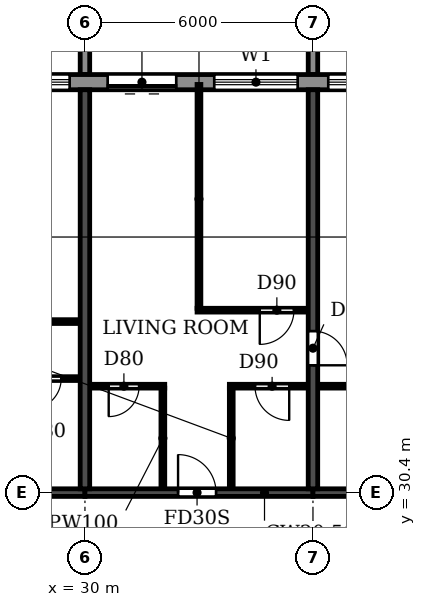
"""IFC4 building model, lengths in metres.
Left out: names, types, materials, properties, quantities, classifications, styles, units other than length and angle.
Written with IfcOpenShell. Run it as: python <this file> out.ifc"""

import sys

from ifc_helpers import new_model, si_unit, direction, frame, frame_2d, origin, place, context, subcontext, project, spatial, polyline, rectangle, outline, extrude, source, transform, mapped, element, fill, save


model = new_model("IFC4")
c1 = context("Model", 3, precision=1e-05, world=origin(), true_north=direction((0.0, 1.0)))
c2 = subcontext(c1, "Body", "Model", "MODEL_VIEW")
j1 = project(units=[si_unit("LENGTHUNIT", "METRE"), si_unit("PLANEANGLEUNIT", "RADIAN")], contexts=[c1])
p1 = place(None, origin())
s1 = spatial("IfcSite", under=j1, at=p1, CompositionType="ELEMENT")
p2 = place(p1, origin())
s2 = spatial("IfcBuilding", under=s1, at=p2, CompositionType="ELEMENT")
p3 = place(p2, frame((0.0, 0.0, 191.7)))
s3 = spatial("IfcBuildingStorey", under=s2, at=p3, CompositionType="ELEMENT", Elevation=191.7)
p4 = place(p3, frame((30.0, 30.5, 0.0), z_axis=(0.0, 0.0, 1.0), x_axis=(0.0, 1.0, 0.0)))
e1 = element("IfcWall", 1, at=p4, inside=s3, PredefinedType="SHEAR", context=c2, shape_type="SweptSolid", body=[
    extrude(rectangle(XDim=10.5, YDim=0.25, at=frame_2d((5.25, 0.0))), origin(), (0.0, 0.0, 1.0), 3.08),
])
p5 = place(p3, frame((36.0, 30.5, 0.0), z_axis=(0.0, 0.0, 1.0), x_axis=(0.0, 1.0, 0.0)))
e2 = element("IfcWall", 2, at=p5, inside=s3, PredefinedType="SHEAR", context=c2, shape_type="SweptSolid", body=[
    extrude(rectangle(XDim=10.5, YDim=0.25, at=frame_2d((5.25, 0.0))), origin(), (0.0, 0.0, 1.0), 3.08),
])
p6 = place(p5, frame((3.25, 0.0, 0.0)))
e3 = element("IfcOpeningElement", 3, at=p6, cuts=e2, PredefinedType="OPENING", context=c2, shape_type="SweptSolid", body=[
    extrude(rectangle(XDim=0.9, YDim=2.1, at=frame_2d((0.45, 1.05))), frame((0.0, 0.135, 0.0), z_axis=(0.0, -1.0, 0.0), x_axis=(1.0, 0.0, 0.0)), (0.0, 0.0, 1.0), 0.27),
])
p7 = place(p3, frame((24.0, 30.4, 0.0), z_axis=(0.0, 0.0, 1.0), x_axis=(1.0, 0.0, 0.0)))
e4 = element("IfcWall", 4, at=p7, inside=s3, PredefinedType="SHEAR", context=c2, shape_type="SweptSolid", body=[
    extrude(rectangle(XDim=6.0, YDim=0.2, at=frame_2d((3.0, 0.0))), origin(), (0.0, 0.0, 1.0), 2.48),
])
p8 = place(p7, frame((2.55, 0.0, 0.0)))
e5 = element("IfcOpeningElement", 5, at=p8, cuts=e4, PredefinedType="OPENING", context=c2, shape_type="SweptSolid", body=[
    extrude(rectangle(XDim=1.0, YDim=2.1, at=frame_2d((0.5, 1.05))), frame((0.0, 0.11, 0.0), z_axis=(0.0, -1.0, 0.0), x_axis=(1.0, 0.0, 0.0)), (0.0, 0.0, 1.0), 0.22),
])
p9 = place(p3, frame((30.0, 30.4, 0.0), z_axis=(0.0, 0.0, 1.0), x_axis=(1.0, 0.0, 0.0)))
e6 = element("IfcWall", 6, at=p9, inside=s3, PredefinedType="SHEAR", context=c2, shape_type="SweptSolid", body=[
    extrude(rectangle(XDim=6.0, YDim=0.2, at=frame_2d((3.0, 0.0))), origin(), (0.0, 0.0, 1.0), 2.48),
])
p10 = place(p9, frame((2.45, 0.0, 0.0)))
e7 = element("IfcOpeningElement", 7, at=p10, cuts=e6, PredefinedType="OPENING", context=c2, shape_type="SweptSolid", body=[
    extrude(rectangle(XDim=1.0, YDim=2.1, at=frame_2d((0.5, 1.05))), frame((0.0, 0.11, 0.0), z_axis=(0.0, -1.0, 0.0), x_axis=(1.0, 0.0, 0.0)), (0.0, 0.0, 1.0), 0.22),
])
p11 = place(p3, frame((36.0, 30.4, 0.0), z_axis=(0.0, 0.0, 1.0), x_axis=(1.0, 0.0, 0.0)))
e8 = element("IfcWall", 8, at=p11, inside=s3, PredefinedType="SHEAR", context=c2, shape_type="SweptSolid", body=[
    extrude(rectangle(XDim=6.0, YDim=0.2, at=frame_2d((3.0, 0.0))), origin(), (0.0, 0.0, 1.0), 2.48),
])
p12 = place(p3, frame((79.317, 41.2, 0.0), z_axis=(0.0, 0.0, 1.0), x_axis=(-1.0, 0.0, 0.0)))
e9 = element("IfcWall", 9, at=p12, inside=s3, PredefinedType="STANDARD", context=c2, shape_type="SweptSolid", body=[
    extrude(rectangle(XDim=56.634, YDim=0.4, at=frame_2d((28.317, 0.0))), origin(), (0.0, 0.0, 1.0), 3.08),
])
p13 = place(p12, frame((52.917, 0.0, 0.0)))
e10 = element("IfcOpeningElement", 10, at=p13, cuts=e9, PredefinedType="OPENING", context=c2, shape_type="SweptSolid", body=[
    extrude(rectangle(XDim=1.8, YDim=2.4, at=frame_2d((0.9, 1.2))), frame((0.0, 0.21, 0.0), z_axis=(0.0, -1.0, 0.0), x_axis=(1.0, 0.0, 0.0)), (0.0, 0.0, 1.0), 0.42),
])
p14 = place(p12, frame((49.717, 0.0, 0.9)))
e11 = element("IfcOpeningElement", 11, at=p14, cuts=e9, PredefinedType="OPENING", context=c2, shape_type="SweptSolid", body=[
    extrude(rectangle(XDim=2.2, YDim=1.5, at=frame_2d((1.1, 0.75))), frame((0.0, 0.21, 0.0), z_axis=(0.0, -1.0, 0.0), x_axis=(1.0, 0.0, 0.0)), (0.0, 0.0, 1.0), 0.42),
])
p15 = place(p12, frame((46.917, 0.0, 0.0)))
e12 = element("IfcOpeningElement", 12, at=p15, cuts=e9, PredefinedType="OPENING", context=c2, shape_type="SweptSolid", body=[
    extrude(rectangle(XDim=1.8, YDim=2.4, at=frame_2d((0.9, 1.2))), frame((0.0, 0.21, 0.0), z_axis=(0.0, -1.0, 0.0), x_axis=(1.0, 0.0, 0.0)), (0.0, 0.0, 1.0), 0.42),
])
p16 = place(p12, frame((43.717, 0.0, 0.9)))
e13 = element("IfcOpeningElement", 13, at=p16, cuts=e9, PredefinedType="OPENING", context=c2, shape_type="SweptSolid", body=[
    extrude(rectangle(XDim=2.2, YDim=1.5, at=frame_2d((1.1, 0.75))), frame((0.0, 0.21, 0.0), z_axis=(0.0, -1.0, 0.0), x_axis=(1.0, 0.0, 0.0)), (0.0, 0.0, 1.0), 0.42),
])
p17 = place(p12, frame((40.717, 0.0, 0.9)))
e14 = element("IfcOpeningElement", 14, at=p17, cuts=e9, PredefinedType="OPENING", context=c2, shape_type="SweptSolid", body=[
    extrude(rectangle(XDim=2.2, YDim=1.5, at=frame_2d((1.1, 0.75))), frame((0.0, 0.21, 0.0), z_axis=(0.0, -1.0, 0.0), x_axis=(1.0, 0.0, 0.0)), (0.0, 0.0, 1.0), 0.42),
])
p18 = place(p12, frame((37.717, 0.0, 0.9)))
e15 = element("IfcOpeningElement", 15, at=p18, cuts=e9, PredefinedType="OPENING", context=c2, shape_type="SweptSolid", body=[
    extrude(rectangle(XDim=2.2, YDim=1.5, at=frame_2d((1.1, 0.75))), frame((0.0, 0.21, 0.0), z_axis=(0.0, -1.0, 0.0), x_axis=(1.0, 0.0, 0.0)), (0.0, 0.0, 1.0), 0.42),
])
p19 = place(p12, frame((34.917, 0.0, 0.0)))
e16 = element("IfcOpeningElement", 16, at=p19, cuts=e9, PredefinedType="OPENING", context=c2, shape_type="SweptSolid", body=[
    extrude(rectangle(XDim=1.8, YDim=2.4, at=frame_2d((0.9, 1.2))), frame((0.0, 0.21, 0.0), z_axis=(0.0, -1.0, 0.0), x_axis=(1.0, 0.0, 0.0)), (0.0, 0.0, 1.0), 0.42),
])
p20 = place(p12, frame((31.717, 0.0, 0.9)))
e17 = element("IfcOpeningElement", 17, at=p20, cuts=e9, PredefinedType="OPENING", context=c2, shape_type="SweptSolid", body=[
    extrude(rectangle(XDim=2.2, YDim=1.5, at=frame_2d((1.1, 0.75))), frame((0.0, 0.21, 0.0), z_axis=(0.0, -1.0, 0.0), x_axis=(1.0, 0.0, 0.0)), (0.0, 0.0, 1.0), 0.42),
])
p21 = place(p12, frame((28.717, 0.0, 0.9)))
e18 = element("IfcOpeningElement", 18, at=p21, cuts=e9, PredefinedType="OPENING", context=c2, shape_type="SweptSolid", body=[
    extrude(rectangle(XDim=2.2, YDim=1.5, at=frame_2d((1.1, 0.75))), frame((0.0, 0.21, 0.0), z_axis=(0.0, -1.0, 0.0), x_axis=(1.0, 0.0, 0.0)), (0.0, 0.0, 1.0), 0.42),
])
p22 = place(p12, frame((25.717, 0.0, 0.9)))
e19 = element("IfcOpeningElement", 19, at=p22, cuts=e9, PredefinedType="OPENING", context=c2, shape_type="SweptSolid", body=[
    extrude(rectangle(XDim=2.2, YDim=1.5, at=frame_2d((1.1, 0.75))), frame((0.0, 0.21, 0.0), z_axis=(0.0, -1.0, 0.0), x_axis=(1.0, 0.0, 0.0)), (0.0, 0.0, 1.0), 0.42),
])
p23 = place(p12, frame((22.917, 0.0, 0.0)))
e20 = element("IfcOpeningElement", 20, at=p23, cuts=e9, PredefinedType="OPENING", context=c2, shape_type="SweptSolid", body=[
    extrude(rectangle(XDim=1.8, YDim=2.4, at=frame_2d((0.9, 1.2))), frame((0.0, 0.21, 0.0), z_axis=(0.0, -1.0, 0.0), x_axis=(1.0, 0.0, 0.0)), (0.0, 0.0, 1.0), 0.42),
])
p24 = place(p12, frame((19.717, 0.0, 0.9)))
e21 = element("IfcOpeningElement", 21, at=p24, cuts=e9, PredefinedType="OPENING", context=c2, shape_type="SweptSolid", body=[
    extrude(rectangle(XDim=2.2, YDim=1.5, at=frame_2d((1.1, 0.75))), frame((0.0, 0.21, 0.0), z_axis=(0.0, -1.0, 0.0), x_axis=(1.0, 0.0, 0.0)), (0.0, 0.0, 1.0), 0.42),
])
p25 = place(p12, frame((16.717, 0.0, 0.9)))
e22 = element("IfcOpeningElement", 22, at=p25, cuts=e9, PredefinedType="OPENING", context=c2, shape_type="SweptSolid", body=[
    extrude(rectangle(XDim=2.2, YDim=1.5, at=frame_2d((1.1, 0.75))), frame((0.0, 0.21, 0.0), z_axis=(0.0, -1.0, 0.0), x_axis=(1.0, 0.0, 0.0)), (0.0, 0.0, 1.0), 0.42),
])
p26 = place(p12, frame((13.717, 0.0, 0.9)))
e23 = element("IfcOpeningElement", 23, at=p26, cuts=e9, PredefinedType="OPENING", context=c2, shape_type="SweptSolid", body=[
    extrude(rectangle(XDim=2.2, YDim=1.5, at=frame_2d((1.1, 0.75))), frame((0.0, 0.21, 0.0), z_axis=(0.0, -1.0, 0.0), x_axis=(1.0, 0.0, 0.0)), (0.0, 0.0, 1.0), 0.42),
])
p27 = place(p12, frame((10.717, 0.0, 0.9)))
e24 = element("IfcOpeningElement", 24, at=p27, cuts=e9, PredefinedType="OPENING", context=c2, shape_type="SweptSolid", body=[
    extrude(rectangle(XDim=2.2, YDim=1.5, at=frame_2d((1.1, 0.75))), frame((0.0, 0.21, 0.0), z_axis=(0.0, -1.0, 0.0), x_axis=(1.0, 0.0, 0.0)), (0.0, 0.0, 1.0), 0.42),
])
p28 = place(p12, frame((7.917, 0.0, 0.0)))
e25 = element("IfcOpeningElement", 25, at=p28, cuts=e9, PredefinedType="OPENING", context=c2, shape_type="SweptSolid", body=[
    extrude(rectangle(XDim=1.8, YDim=2.4, at=frame_2d((0.9, 1.2))), frame((0.0, 0.21, 0.0), z_axis=(0.0, -1.0, 0.0), x_axis=(1.0, 0.0, 0.0)), (0.0, 0.0, 1.0), 0.42),
])
p29 = place(p12, frame((4.717, 0.0, 0.9)))
e26 = element("IfcOpeningElement", 26, at=p29, cuts=e9, PredefinedType="OPENING", context=c2, shape_type="SweptSolid", body=[
    extrude(rectangle(XDim=2.2, YDim=1.5, at=frame_2d((1.1, 0.75))), frame((0.0, 0.21, 0.0), z_axis=(0.0, -1.0, 0.0), x_axis=(1.0, 0.0, 0.0)), (0.0, 0.0, 1.0), 0.42),
])
p30 = place(p12, frame((1.917, 0.0, 0.0)))
e27 = element("IfcOpeningElement", 27, at=p30, cuts=e9, PredefinedType="OPENING", context=c2, shape_type="SweptSolid", body=[
    extrude(rectangle(XDim=1.8, YDim=2.4, at=frame_2d((0.9, 1.2))), frame((0.0, 0.21, 0.0), z_axis=(0.0, -1.0, 0.0), x_axis=(1.0, 0.0, 0.0)), (0.0, 0.0, 1.0), 0.42),
])
m1 = source(origin(), c2, "Body", "SweptSolid", [
    extrude(outline(polyline([(0.0, 0.0), (0.25, 0.0), (0.25, 3.1), (0.0, 3.1), (0.0, 0.0)])), origin(), (0.0, 0.0, 1.0), 3.1),
])
for number, where in (
    (28, (29.875, 41.4, 0.0)),
    (29, (35.875, 41.4, 0.0)),
):
    element("IfcWall", number, at=place(p3, frame(where)), inside=s3, PredefinedType="STANDARD", context=c2, shape_type="MappedRepresentation", body=[
        mapped(m1, transform((0.0, 0.0, 0.0))),
    ])
p31 = place(p3, frame((30.135, 33.2, 0.0), z_axis=(0.0, 0.0, 1.0), x_axis=(1.0, 0.0, 0.0)))
e30 = element("IfcWall", 30, at=p31, inside=s3, PredefinedType="PARTITIONING", context=c2, shape_type="SweptSolid", body=[
    extrude(rectangle(XDim=1.965, YDim=0.1, at=frame_2d((0.982, 0.0))), origin(), (0.0, 0.0, 1.0), 3.08),
])
p32 = place(p31, frame((0.49, 0.0, 0.0)))
e31 = element("IfcOpeningElement", 31, at=p32, cuts=e30, PredefinedType="OPENING", context=c2, shape_type="SweptSolid", body=[
    extrude(rectangle(XDim=0.8, YDim=2.1, at=frame_2d((0.4, 1.05))), frame((0.0, 0.06, 0.0), z_axis=(0.0, -1.0, 0.0), x_axis=(1.0, 0.0, 0.0)), (0.0, 0.0, 1.0), 0.12),
])
p33 = place(p3, frame((33.8, 33.2, 0.0), z_axis=(0.0, 0.0, 1.0), x_axis=(1.0, 0.0, 0.0)))
e32 = element("IfcWall", 32, at=p33, inside=s3, PredefinedType="PARTITIONING", context=c2, shape_type="SweptSolid", body=[
    extrude(rectangle(XDim=2.065, YDim=0.1, at=frame_2d((1.032, 0.0))), origin(), (0.0, 0.0, 1.0), 3.08),
])
p34 = place(p33, frame((0.675, 0.0, 0.0)))
e33 = element("IfcOpeningElement", 33, at=p34, cuts=e32, PredefinedType="OPENING", context=c2, shape_type="SweptSolid", body=[
    extrude(rectangle(XDim=0.9, YDim=2.1, at=frame_2d((0.45, 1.05))), frame((0.0, 0.06, 0.0), z_axis=(0.0, -1.0, 0.0), x_axis=(1.0, 0.0, 0.0)), (0.0, 0.0, 1.0), 0.12),
])
p35 = place(p3, frame((36.135, 33.2, 0.0), z_axis=(0.0, 0.0, 1.0), x_axis=(1.0, 0.0, 0.0)))
e34 = element("IfcWall", 34, at=p35, inside=s3, PredefinedType="PARTITIONING", context=c2, shape_type="SweptSolid", body=[
    extrude(rectangle(XDim=2.965, YDim=0.1, at=frame_2d((1.482, 0.0))), origin(), (0.0, 0.0, 1.0), 3.08),
])
p36 = place(p35, frame((0.965, 0.0, 0.0)))
e35 = element("IfcOpeningElement", 35, at=p36, cuts=e34, PredefinedType="OPENING", context=c2, shape_type="SweptSolid", body=[
    extrude(rectangle(XDim=0.8, YDim=2.1, at=frame_2d((0.4, 1.05))), frame((0.0, 0.06, 0.0), z_axis=(0.0, -1.0, 0.0), x_axis=(1.0, 0.0, 0.0)), (0.0, 0.0, 1.0), 0.12),
])
p37 = place(p3, frame((27.9, 33.4, 0.0), z_axis=(0.0, 0.0, 1.0), x_axis=(1.0, 0.0, 0.0)))
e36 = element("IfcWall", 36, at=p37, inside=s3, PredefinedType="PARTITIONING", context=c2, shape_type="SweptSolid", body=[
    extrude(rectangle(XDim=1.965, YDim=0.1, at=frame_2d((0.982, 0.0))), origin(), (0.0, 0.0, 1.0), 3.08),
])
p38 = place(p37, frame((0.675, 0.0, 0.0)))
e37 = element("IfcOpeningElement", 37, at=p38, cuts=e36, PredefinedType="OPENING", context=c2, shape_type="SweptSolid", body=[
    extrude(rectangle(XDim=0.8, YDim=2.1, at=frame_2d((0.4, 1.05))), frame((0.0, 0.06, 0.0), z_axis=(0.0, -1.0, 0.0), x_axis=(1.0, 0.0, 0.0)), (0.0, 0.0, 1.0), 0.12),
])
p39 = place(p3, frame((26.95, 34.9, 0.0), z_axis=(0.0, 0.0, 1.0), x_axis=(1.0, 0.0, 0.0)))
e38 = element("IfcWall", 38, at=p39, inside=s3, PredefinedType="PARTITIONING", context=c2, shape_type="SweptSolid", body=[
    extrude(rectangle(XDim=2.915, YDim=0.1, at=frame_2d((1.458, 0.0))), origin(), (0.0, 0.0, 1.0), 3.08),
])
p40 = place(p39, frame((0.55, 0.0, 0.0)))
e39 = element("IfcOpeningElement", 39, at=p40, cuts=e38, PredefinedType="OPENING", context=c2, shape_type="SweptSolid", body=[
    extrude(rectangle(XDim=0.9, YDim=2.1, at=frame_2d((0.45, 1.05))), frame((0.0, 0.06, 0.0), z_axis=(0.0, -1.0, 0.0), x_axis=(1.0, 0.0, 0.0)), (0.0, 0.0, 1.0), 0.12),
])
p41 = place(p3, frame((32.95, 35.2, 0.0), z_axis=(0.0, 0.0, 1.0), x_axis=(1.0, 0.0, 0.0)))
e40 = element("IfcWall", 40, at=p41, inside=s3, PredefinedType="PARTITIONING", context=c2, shape_type="SweptSolid", body=[
    extrude(rectangle(XDim=2.915, YDim=0.1, at=frame_2d((1.458, 0.0))), origin(), (0.0, 0.0, 1.0), 3.08),
])
p42 = place(p41, frame((1.65, 0.0, 0.0)))
e41 = element("IfcOpeningElement", 41, at=p42, cuts=e40, PredefinedType="OPENING", context=c2, shape_type="SweptSolid", body=[
    extrude(rectangle(XDim=0.9, YDim=2.1, at=frame_2d((0.45, 1.05))), frame((0.0, 0.06, 0.0), z_axis=(0.0, -1.0, 0.0), x_axis=(1.0, 0.0, 0.0)), (0.0, 0.0, 1.0), 0.12),
])
p43 = place(p3, frame((32.05, 30.51, 0.0), z_axis=(0.0, 0.0, 1.0), x_axis=(0.0, 1.0, 0.0)))
e42 = element("IfcWall", 42, at=p43, inside=s3, PredefinedType="PARTITIONING", context=c2, shape_type="SweptSolid", body=[
    extrude(rectangle(XDim=2.64, YDim=0.1, at=frame_2d((1.32, 0.0))), origin(), (0.0, 0.0, 1.0), 3.08),
])
p44 = place(p3, frame((33.0, 35.25, 0.0), z_axis=(0.0, 0.0, 1.0), x_axis=(0.0, 1.0, 0.0)))
e43 = element("IfcWall", 43, at=p44, inside=s3, PredefinedType="PARTITIONING", context=c2, shape_type="SweptSolid", body=[
    extrude(rectangle(XDim=5.89, YDim=0.1, at=frame_2d((2.945, 0.0))), origin(), (0.0, 0.0, 1.0), 3.08),
])
p45 = place(p3, frame((33.85, 30.51, 0.0), z_axis=(0.0, 0.0, 1.0), x_axis=(0.0, 1.0, 0.0)))
e44 = element("IfcWall", 44, at=p45, inside=s3, PredefinedType="PARTITIONING", context=c2, shape_type="SweptSolid", body=[
    extrude(rectangle(XDim=2.64, YDim=0.1, at=frame_2d((1.32, 0.0))), origin(), (0.0, 0.0, 1.0), 3.08),
])
p46 = place(p14, origin())
e45 = element("IfcWindow", 45, at=p46, inside=s3, PartitioningType="DOUBLE_PANEL_HORIZONTAL", PredefinedType="WINDOW", context=c2, shape_type="SweptSolid", body=[
    extrude(rectangle(XDim=2.2, YDim=1.5, at=frame_2d((1.1, 0.75))), frame((0.0, 0.03, 0.0), z_axis=(0.0, -1.0, 0.0), x_axis=(1.0, 0.0, 0.0)), (0.0, 0.0, 1.0), 0.06),
])
fill(e11, e45)
p47 = place(p15, origin())
e46 = element("IfcDoor", 46, at=p47, inside=s3, OperationType="DOUBLE_DOOR_SLIDING", PredefinedType="DOOR", context=c2, shape_type="SweptSolid", body=[
    extrude(rectangle(XDim=1.8, YDim=2.4, at=frame_2d((0.9, 1.2))), frame((0.0, 0.025, 0.0), z_axis=(0.0, -1.0, 0.0), x_axis=(1.0, 0.0, 0.0)), (0.0, 0.0, 1.0), 0.05),
])
fill(e12, e46)
p48 = place(p16, origin())
e47 = element("IfcWindow", 47, at=p48, inside=s3, PartitioningType="DOUBLE_PANEL_HORIZONTAL", PredefinedType="WINDOW", context=c2, shape_type="SweptSolid", body=[
    extrude(rectangle(XDim=2.2, YDim=1.5, at=frame_2d((1.1, 0.75))), frame((0.0, 0.03, 0.0), z_axis=(0.0, -1.0, 0.0), x_axis=(1.0, 0.0, 0.0)), (0.0, 0.0, 1.0), 0.06),
])
fill(e13, e47)
p49 = place(p17, origin())
e48 = element("IfcWindow", 48, at=p49, inside=s3, PartitioningType="DOUBLE_PANEL_HORIZONTAL", PredefinedType="WINDOW", context=c2, shape_type="SweptSolid", body=[
    extrude(rectangle(XDim=2.2, YDim=1.5, at=frame_2d((1.1, 0.75))), frame((0.0, 0.03, 0.0), z_axis=(0.0, -1.0, 0.0), x_axis=(1.0, 0.0, 0.0)), (0.0, 0.0, 1.0), 0.06),
])
fill(e14, e48)
p50 = place(p38, frame((0.8, 0.0, 0.0), z_axis=(0.0, 0.0, 1.0), x_axis=(-1.0, 0.0, 0.0)))
e49 = element("IfcDoor", 49, at=p50, inside=s3, OperationType="SINGLE_SWING_RIGHT", PredefinedType="DOOR", context=c2, shape_type="SweptSolid", body=[
    extrude(rectangle(XDim=0.8, YDim=2.1, at=frame_2d((0.4, 1.05))), frame((0.0, 0.025, 0.0), z_axis=(0.0, -1.0, 0.0), x_axis=(1.0, 0.0, 0.0)), (0.0, 0.0, 1.0), 0.05),
])
fill(e37, e49)
p51 = place(p32, frame((0.8, 0.0, 0.0), z_axis=(0.0, 0.0, 1.0), x_axis=(-1.0, 0.0, 0.0)))
e50 = element("IfcDoor", 50, at=p51, inside=s3, OperationType="SINGLE_SWING_RIGHT", PredefinedType="DOOR", context=c2, shape_type="SweptSolid", body=[
    extrude(rectangle(XDim=0.8, YDim=2.1, at=frame_2d((0.4, 1.05))), frame((0.0, 0.025, 0.0), z_axis=(0.0, -1.0, 0.0), x_axis=(1.0, 0.0, 0.0)), (0.0, 0.0, 1.0), 0.05),
])
fill(e31, e50)
p52 = place(p10, origin())
e51 = element("IfcDoor", 51, at=p52, inside=s3, OperationType="SINGLE_SWING_LEFT", PredefinedType="DOOR", context=c2, shape_type="SweptSolid", body=[
    extrude(rectangle(XDim=1.0, YDim=2.1, at=frame_2d((0.5, 1.05))), frame((0.0, 0.025, 0.0), z_axis=(0.0, -1.0, 0.0), x_axis=(1.0, 0.0, 0.0)), (0.0, 0.0, 1.0), 0.05),
])
fill(e7, e51)
p53 = place(p34, frame((0.9, 0.0, 0.0), z_axis=(0.0, 0.0, 1.0), x_axis=(-1.0, 0.0, 0.0)))
e52 = element("IfcDoor", 52, at=p53, inside=s3, OperationType="SINGLE_SWING_LEFT", PredefinedType="DOOR", context=c2, shape_type="SweptSolid", body=[
    extrude(rectangle(XDim=0.9, YDim=2.1, at=frame_2d((0.45, 1.05))), frame((0.0, 0.025, 0.0), z_axis=(0.0, -1.0, 0.0), x_axis=(1.0, 0.0, 0.0)), (0.0, 0.0, 1.0), 0.05),
])
fill(e33, e52)
p54 = place(p42, frame((0.9, 0.0, 0.0), z_axis=(0.0, 0.0, 1.0), x_axis=(-1.0, 0.0, 0.0)))
e53 = element("IfcDoor", 53, at=p54, inside=s3, OperationType="SINGLE_SWING_RIGHT", PredefinedType="DOOR", context=c2, shape_type="SweptSolid", body=[
    extrude(rectangle(XDim=0.9, YDim=2.1, at=frame_2d((0.45, 1.05))), frame((0.0, 0.025, 0.0), z_axis=(0.0, -1.0, 0.0), x_axis=(1.0, 0.0, 0.0)), (0.0, 0.0, 1.0), 0.05),
])
fill(e41, e53)
p55 = place(p6, frame((0.9, 0.0, 0.0), z_axis=(0.0, 0.0, 1.0), x_axis=(-1.0, 0.0, 0.0)))
e54 = element("IfcDoor", 54, at=p55, inside=s3, OperationType="SINGLE_SWING_RIGHT", PredefinedType="DOOR", context=c2, shape_type="SweptSolid", body=[
    extrude(rectangle(XDim=0.9, YDim=2.1, at=frame_2d((0.45, 1.05))), frame((0.0, 0.025, 0.0), z_axis=(0.0, -1.0, 0.0), x_axis=(1.0, 0.0, 0.0)), (0.0, 0.0, 1.0), 0.05),
])
fill(e3, e54)
save(model, sys.argv[1])
